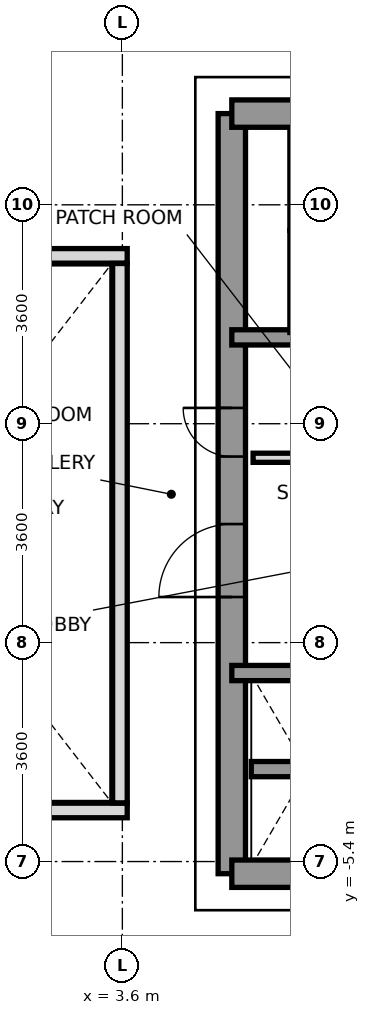
"""IFC4 building model, lengths in metres.
Left out: names, types, materials, properties, quantities, classifications, styles, units other than length and angle.
Written with IfcOpenShell. Run it as: python <this file> out.ifc"""

import sys

from ifc_helpers import new_model, si_unit, direction, frame, frame_2d, origin, place, context, subcontext, project, spatial, rectangle, extrude, source, transform, mapped, element, fill, save


model = new_model("IFC4")
c1 = context("Model", 3, precision=1e-05, world=origin(), true_north=direction((0.0, 1.0)))
c2 = subcontext(c1, "Body", "Model", "MODEL_VIEW")
j1 = project(units=[si_unit("LENGTHUNIT", "METRE"), si_unit("PLANEANGLEUNIT", "RADIAN")], contexts=[c1])
p1 = place(None, origin())
s1 = spatial("IfcSite", under=j1, at=p1, CompositionType="ELEMENT")
p2 = place(p1, origin())
s2 = spatial("IfcBuilding", under=s1, at=p2, CompositionType="ELEMENT")
p3 = place(p2, frame((0.0, 0.0, 100.6)))
s3 = spatial("IfcBuildingStorey", under=s2, at=p3, CompositionType="ELEMENT", Elevation=100.6)
p4 = place(p3, frame((5.4, -5.6, 0.0), z_axis=(0.0, 0.0, 1.0), x_axis=(0.0, 1.0, 0.0)))
e1 = element("IfcWall", 1, at=p4, inside=s3, PredefinedType="SHEAR", context=c2, shape_type="SweptSolid", body=[
    extrude(rectangle(XDim=12.5, YDim=0.45, at=frame_2d((6.25, 0.0))), origin(), (0.0, 0.0, 1.0), 3.2),
])
p5 = place(p4, frame((4.55, 0.0, 0.0)))
e2 = element("IfcOpeningElement", 2, at=p5, cuts=e1, PredefinedType="OPENING", context=c2, shape_type="SweptSolid", body=[
    extrude(rectangle(XDim=1.2, YDim=2.2, at=frame_2d((0.6, 1.1))), frame((0.0, 0.235, 0.0), z_axis=(0.0, -1.0, 0.0), x_axis=(1.0, 0.0, 0.0)), (0.0, 0.0, 1.0), 0.47),
])
p6 = place(p4, frame((6.86, 0.0, 0.0)))
e3 = element("IfcOpeningElement", 3, at=p6, cuts=e1, PredefinedType="OPENING", context=c2, shape_type="SweptSolid", body=[
    extrude(rectangle(XDim=0.8, YDim=2.1, at=frame_2d((0.4, 1.05))), frame((0.0, 0.235, 0.0), z_axis=(0.0, -1.0, 0.0), x_axis=(1.0, 0.0, 0.0)), (0.0, 0.0, 1.0), 0.47),
])
p7 = place(p3, frame((5.4, 6.9, 0.0), z_axis=(0.0, 0.0, 1.0), x_axis=(1.0, 0.0, 0.0)))
e4 = element("IfcWall", 4, at=p7, inside=s3, PredefinedType="SHEAR", context=c2, shape_type="SweptSolid", body=[
    extrude(rectangle(XDim=5.981, YDim=0.45, at=frame_2d((2.991, 0.0))), origin(), (0.0, 0.0, 1.0), 3.2),
])
p8 = place(p3, frame((5.4, -5.6, 0.0), z_axis=(0.0, 0.0, 1.0), x_axis=(1.0, 0.0, 0.0)))
e5 = element("IfcWall", 5, at=p8, inside=s3, PredefinedType="SHEAR", context=c2, shape_type="SweptSolid", body=[
    extrude(rectangle(XDim=7.8, YDim=0.45, at=frame_2d((3.9, 0.0))), origin(), (0.0, 0.0, 1.0), 3.2),
])
p9 = place(p8, frame((3.0, 0.0, 0.0)))
e6 = element("IfcOpeningElement", 6, at=p9, cuts=e5, PredefinedType="OPENING", context=c2, shape_type="SweptSolid", body=[
    extrude(rectangle(XDim=1.2, YDim=2.2, at=frame_2d((0.6, 1.1))), frame((0.0, 0.235, 0.0), z_axis=(0.0, -1.0, 0.0), x_axis=(1.0, 0.0, 0.0)), (0.0, 0.0, 1.0), 0.47),
])
p10 = place(p3, frame((5.4, 3.22, 0.0), z_axis=(0.0, 0.0, 1.0), x_axis=(1.0, 0.0, 0.0)))
e7 = element("IfcWall", 7, at=p10, inside=s3, PredefinedType="SOLIDWALL", context=c2, shape_type="SweptSolid", body=[
    extrude(rectangle(XDim=2.78, YDim=0.25, at=frame_2d((1.39, 0.0))), origin(), (0.0, 0.0, 1.0), 3.2),
])
p11 = place(p3, frame((5.4, -2.3, 0.0), z_axis=(0.0, 0.0, 1.0), x_axis=(1.0, 0.0, 0.0)))
e8 = element("IfcWall", 8, at=p11, inside=s3, PredefinedType="SOLIDWALL", context=c2, shape_type="SweptSolid", body=[
    extrude(rectangle(XDim=3.08, YDim=0.25, at=frame_2d((1.54, 0.0))), origin(), (0.0, 0.0, 1.0), 3.2),
])
p12 = place(p3, frame((5.72, -3.88, 0.0), z_axis=(0.0, 0.0, 1.0), x_axis=(1.0, 0.0, 0.0)))
e9 = element("IfcWall", 9, at=p12, inside=s3, PredefinedType="SOLIDWALL", context=c2, shape_type="SweptSolid", body=[
    extrude(rectangle(XDim=1.84, YDim=0.25, at=frame_2d((0.92, 0.0))), origin(), (0.0, 0.0, 1.0), 3.2),
])
p13 = place(p3, frame((6.48, 3.3, 0.0), z_axis=(0.0, 0.0, 1.0), x_axis=(0.0, 1.0, 0.0)))
e10 = element("IfcWall", 10, at=p13, inside=s3, PredefinedType="SOLIDWALL", context=c2, shape_type="SweptSolid", body=[
    extrude(rectangle(XDim=1.68, YDim=0.25, at=frame_2d((0.84, 0.0))), origin(), (0.0, 0.0, 1.0), 3.2),
])
p14 = place(p3, frame((6.48, 4.98, 0.0), z_axis=(0.0, 0.0, 1.0), x_axis=(0.0, 1.0, 0.0)))
e11 = element("IfcWall", 11, at=p14, inside=s3, PredefinedType="SOLIDWALL", context=c2, shape_type="SweptSolid", body=[
    extrude(rectangle(XDim=1.67, YDim=0.25, at=frame_2d((0.835, 0.0))), origin(), (0.0, 0.0, 1.0), 3.2),
])
p15 = place(p3, frame((5.75, 1.24, 0.0), z_axis=(0.0, 0.0, 1.0), x_axis=(1.0, 0.0, 0.0)))
e12 = element("IfcWall", 12, at=p15, inside=s3, PredefinedType="PARTITIONING", context=c2, shape_type="SweptSolid", body=[
    extrude(rectangle(XDim=2.39, YDim=0.15, at=frame_2d((1.195, 0.0))), origin(), (0.0, 0.0, 1.0), 2.3),
])
for number, where, z_axis, x_axis in (
    (13, (-3.68, -4.56, 0.0), (0.0, 0.0, 1.0), (1.0, 0.0, 0.0)),
    (14, (-3.68, 4.56, 0.0), (0.0, 0.0, 1.0), (1.0, 0.0, 0.0)),
):
    element("IfcWall", number, at=place(p3, frame(where, z_axis=z_axis, x_axis=x_axis)), inside=s3, PredefinedType="PARAPET", context=c2, shape_type="SweptSolid", body=[
        extrude(rectangle(XDim=7.36, YDim=0.24, at=frame_2d((3.68, 0.0))), origin(), (0.0, 0.0, 1.0), 1.15),
    ])
p16 = place(p3, frame((3.56, -4.435, 0.0), z_axis=(0.0, 0.0, 1.0), x_axis=(0.0, 1.0, 0.0)))
e15 = element("IfcWall", 15, at=p16, inside=s3, PredefinedType="PARAPET", context=c2, shape_type="SweptSolid", body=[
    extrude(rectangle(XDim=8.87, YDim=0.24, at=frame_2d((4.435, 0.0))), origin(), (0.0, 0.0, 1.0), 1.15),
])
m1 = source(origin(), c2, "Body", "SweptSolid", [
    extrude(rectangle(XDim=1.2, YDim=2.2, at=frame_2d((0.6, 1.1))), frame((0.0, 0.025, 0.0), z_axis=(0.0, -1.0, 0.0), x_axis=(1.0, 0.0, 0.0)), (0.0, 0.0, 1.0), 0.05),
])
p17 = place(p5, origin())
e16 = element("IfcDoor", 16, at=p17, inside=s3, OperationType="SINGLE_SWING_LEFT", PredefinedType="DOOR", context=c2, shape_type="MappedRepresentation", body=[
    mapped(m1, transform((0.0, 0.0, 0.0), x_axis=(1.0, 0.0, 0.0), y_axis=(0.0, 1.0, 0.0), z_axis=(0.0, 0.0, 1.0), scale=1.0)),
])
fill(e2, e16)
m2 = source(origin(), c2, "Body", "SweptSolid", [
    extrude(rectangle(XDim=0.8, YDim=2.1, at=frame_2d((0.4, 1.05))), frame((0.0, 0.025, 0.0), z_axis=(0.0, -1.0, 0.0), x_axis=(1.0, 0.0, 0.0)), (0.0, 0.0, 1.0), 0.05),
])
p18 = place(p6, origin())
e17 = element("IfcDoor", 17, at=p18, inside=s3, OperationType="SINGLE_SWING_RIGHT", PredefinedType="DOOR", context=c2, shape_type="MappedRepresentation", body=[
    mapped(m2, transform((0.0, 0.0, 0.0), x_axis=(1.0, 0.0, 0.0), y_axis=(0.0, 1.0, 0.0), z_axis=(0.0, 0.0, 1.0), scale=1.0)),
])
fill(e3, e17)
save(model, sys.argv[1])
